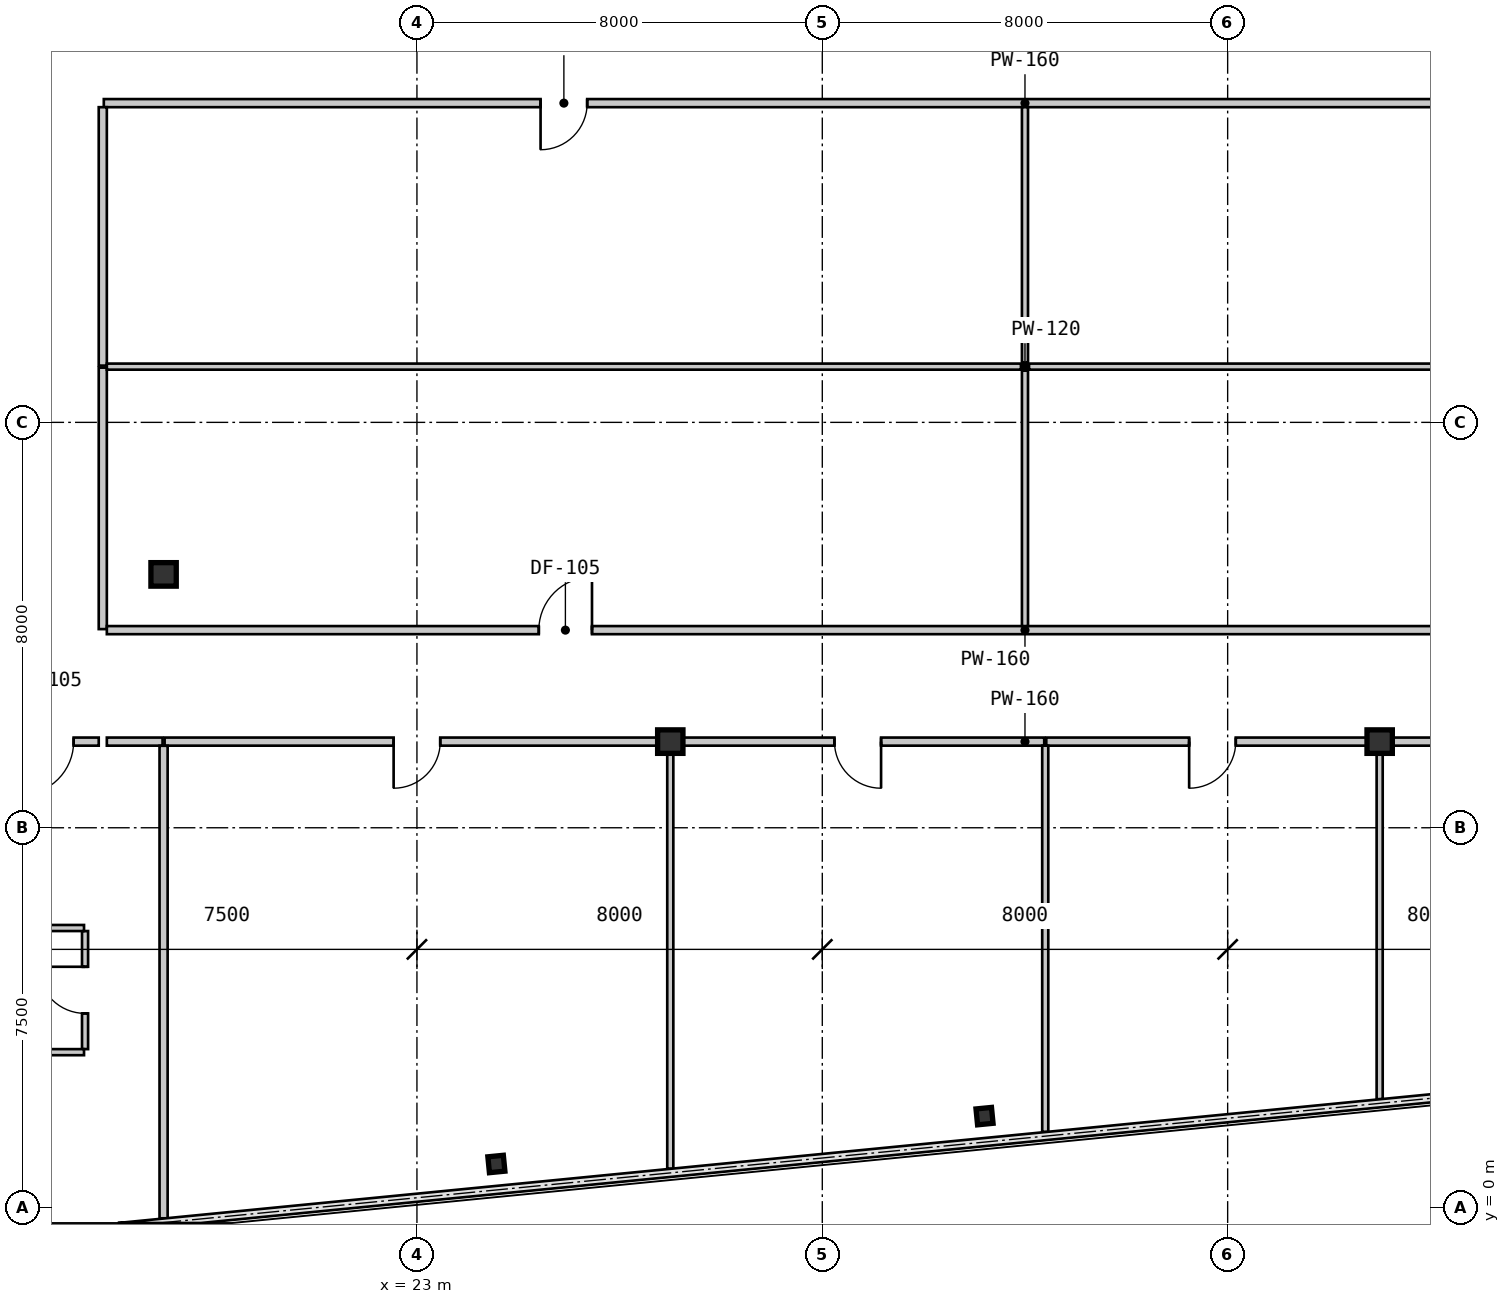
"""IFC4 building model, lengths in metres.
Left out: names, types, materials, properties, quantities, classifications, styles, units other than length and angle.
Written with IfcOpenShell. Run it as: python <this file> out.ifc"""

import sys

from ifc_helpers import new_model, si_unit, direction, frame, frame_2d, origin, origin_2d, place, context, subcontext, project, spatial, rectangle, i_section, extrude, source, transform, mapped, element, fill, save


model = new_model("IFC4")
c1 = context("Model", 3, precision=1e-05, world=origin(), true_north=direction((0.0, 1.0)))
c2 = subcontext(c1, "Body", "Model", "MODEL_VIEW")
j1 = project(units=[si_unit("LENGTHUNIT", "METRE"), si_unit("PLANEANGLEUNIT", "RADIAN")], contexts=[c1])
p1 = place(None, origin())
s1 = spatial("IfcSite", under=j1, at=p1, CompositionType="ELEMENT")
p2 = place(p1, origin())
s2 = spatial("IfcBuilding", under=s1, at=p2, CompositionType="ELEMENT")
p3 = place(p2, frame((0.0, 0.0, 74.55)))
s3 = spatial("IfcBuildingStorey", under=s2, at=p3, CompositionType="ELEMENT", Elevation=74.55)
m1 = source(origin(), c2, "Body", "SweptSolid", [
    extrude(i_section(OverallWidth=0.5, OverallDepth=0.464, WebThickness=0.022, FlangeThickness=0.034, at=origin_2d()), origin(), (0.0, 0.0, 1.0), 3.15),
])
for number, where, z_axis, x_axis in (
    (1, (28.0, 9.2, 0.0), (0.0, 0.0, 1.0), (1.0, 0.0, 0.0)),
    (2, (42.0, 9.2, 0.0), (0.0, 0.0, 1.0), (1.0, 0.0, 0.0)),
    (3, (18.0, 12.5, 0.0), (0.0, 0.0, 1.0), (1.0, 0.0, 0.0)),
):
    element("IfcColumn", number, at=place(p3, frame(where, z_axis=z_axis, x_axis=x_axis)), inside=s3, PredefinedType="COLUMN", context=c2, shape_type="MappedRepresentation", body=[
        mapped(m1, transform((0.0, 0.0, 0.0), scale=1.0)),
    ])
m2 = source(origin(), c2, "Body", "SweptSolid", [
    extrude(i_section(OverallWidth=0.307, OverallDepth=0.315, WebThickness=0.012, FlangeThickness=0.019, at=origin_2d()), origin(), (0.0, 0.0, 1.0), 3.15),
])
for number, where, z_axis, x_axis in (
    (4, (24.568, 0.865, 0.0), (0.0, 0.0, 1.0), (0.995, 0.098, 0.0)),
    (5, (34.202, 1.809, 0.0), (0.0, 0.0, 1.0), (0.995, 0.098, 0.0)),
):
    element("IfcColumn", number, at=place(p3, frame(where, z_axis=z_axis, x_axis=x_axis)), inside=s3, PredefinedType="COLUMN", context=c2, shape_type="MappedRepresentation", body=[
        mapped(m2, transform((0.0, 0.0, 0.0), scale=1.0)),
    ])
m3 = source(origin(), c2, "Body", "SweptSolid", [
    extrude(rectangle(XDim=5.16, YDim=0.16, at=frame_2d((2.58, 0.0))), origin(), (0.0, 0.0, 1.0), 2.93),
])
p4 = place(p3, frame((16.8, 16.58, 0.0), z_axis=(0.0, 0.0, 1.0), x_axis=(0.0, -1.0, 0.0)))
e6 = element("IfcWall", 6, at=p4, inside=s3, PredefinedType="PARTITIONING", context=c2, shape_type="MappedRepresentation", body=[
    mapped(m3, transform((0.0, 0.0, 0.0), scale=1.0)),
])
m4 = source(origin(), c2, "Body", "SweptSolid", [
    extrude(rectangle(XDim=18.159, YDim=0.16, at=frame_2d((9.08, 0.0))), origin(), (0.0, 0.0, 1.0), 2.93),
])
p5 = place(p3, frame((34.98, 21.8, 0.0), z_axis=(0.0, 0.0, 1.0), x_axis=(-1.0, 0.0, 0.0)))
e7 = element("IfcWall", 7, at=p5, inside=s3, PredefinedType="PARTITIONING", context=c2, shape_type="MappedRepresentation", body=[
    mapped(m4, transform((0.0, 0.0, 0.0), scale=1.0)),
])
m5 = source(origin(), c2, "Body", "SweptSolid", [
    extrude(rectangle(XDim=0.92, YDim=2.1, at=frame_2d((0.46, 1.05))), frame((0.0, 0.09, 0.0), z_axis=(0.0, -1.0, 0.0), x_axis=(1.0, 0.0, 0.0)), (0.0, 0.0, 1.0), 0.18),
])
p6 = place(p5, frame((8.62, 0.0, 0.0)))
e8 = element("IfcOpeningElement", 8, at=p6, cuts=e7, PredefinedType="OPENING", context=c2, shape_type="MappedRepresentation", body=[
    mapped(m5, transform((0.0, 0.0, 0.0), scale=1.0)),
])
m6 = source(origin(), c2, "Body", "SweptSolid", [
    extrude(rectangle(XDim=5.1, YDim=0.16, at=frame_2d((2.55, 0.0))), origin(), (0.0, 0.0, 1.0), 2.93),
])
p7 = place(p3, frame((16.8, 21.72, 0.0), z_axis=(0.0, 0.0, 1.0), x_axis=(0.0, -1.0, 0.0)))
e9 = element("IfcWall", 9, at=p7, inside=s3, PredefinedType="PARTITIONING", context=c2, shape_type="MappedRepresentation", body=[
    mapped(m6, transform((0.0, 0.0, 0.0), scale=1.0)),
])
p8 = place(p3, frame((53.18, 21.8, 0.0), z_axis=(0.0, 0.0, 1.0), x_axis=(-1.0, 0.0, 0.0)))
e10 = element("IfcWall", 10, at=p8, inside=s3, PredefinedType="PARTITIONING", context=c2, shape_type="MappedRepresentation", body=[
    mapped(m4, transform((0.0, 0.0, 0.0), scale=1.0)),
])
p9 = place(p8, frame((8.62, 0.0, 0.0)))
e11 = element("IfcOpeningElement", 11, at=p9, cuts=e10, PredefinedType="OPENING", context=c2, shape_type="MappedRepresentation", body=[
    mapped(m5, transform((0.0, 0.0, 0.0), scale=1.0)),
])
m7 = source(origin(), c2, "Body", "SweptSolid", [
    extrude(rectangle(XDim=2.04, YDim=0.16, at=frame_2d((1.02, 0.0))), origin(), (0.0, 0.0, 1.0), 2.93),
])
p10 = place(p3, frame((16.72, 9.2, 0.0), z_axis=(0.0, 0.0, 1.0), x_axis=(-1.0, 0.0, 0.0)))
e12 = element("IfcWall", 12, at=p10, inside=s3, PredefinedType="PARTITIONING", context=c2, shape_type="MappedRepresentation", body=[
    mapped(m7, transform((0.0, 0.0, 0.0), scale=1.0)),
])
m8 = source(origin(), c2, "Body", "SweptSolid", [
    extrude(rectangle(XDim=1.05, YDim=2.1, at=frame_2d((0.525, 1.05))), frame((0.0, 0.09, 0.0), z_axis=(0.0, -1.0, 0.0), x_axis=(1.0, 0.0, 0.0)), (0.0, 0.0, 1.0), 0.18),
])
p11 = place(p10, frame((0.495, 0.0, 0.0)))
e13 = element("IfcOpeningElement", 13, at=p11, cuts=e12, PredefinedType="OPENING", context=c2, shape_type="MappedRepresentation", body=[
    mapped(m8, transform((0.0, 0.0, 0.0), scale=1.0)),
])
m9 = source(origin(), c2, "Body", "SweptSolid", [
    extrude(rectangle(XDim=18.1, YDim=0.16, at=frame_2d((9.05, 0.0))), origin(), (0.0, 0.0, 1.0), 2.93),
])
p12 = place(p3, frame((16.88, 11.4, 0.0), z_axis=(0.0, 0.0, 1.0), x_axis=(1.0, 0.0, 0.0)))
e14 = element("IfcWall", 14, at=p12, inside=s3, PredefinedType="PARTITIONING", context=c2, shape_type="MappedRepresentation", body=[
    mapped(m9, transform((0.0, 0.0, 0.0), scale=1.0)),
])
p13 = place(p12, frame((8.525, 0.0, 0.0)))
e15 = element("IfcOpeningElement", 15, at=p13, cuts=e14, PredefinedType="OPENING", context=c2, shape_type="MappedRepresentation", body=[
    mapped(m8, transform((0.0, 0.0, 0.0), scale=1.0)),
])
p14 = place(p3, frame((35.02, 11.4, 0.0), z_axis=(0.0, 0.0, 1.0), x_axis=(1.0, 0.0, 0.0)))
e16 = element("IfcWall", 16, at=p14, inside=s3, PredefinedType="PARTITIONING", context=c2, shape_type="MappedRepresentation", body=[
    mapped(m9, transform((0.0, 0.0, 0.0), scale=1.0)),
])
p15 = place(p14, frame((8.525, 0.0, 0.0)))
e17 = element("IfcOpeningElement", 17, at=p15, cuts=e16, PredefinedType="OPENING", context=c2, shape_type="MappedRepresentation", body=[
    mapped(m8, transform((0.0, 0.0, 0.0), scale=1.0)),
])
m10 = source(origin(), c2, "Body", "SweptSolid", [
    extrude(rectangle(XDim=1.1, YDim=0.16, at=frame_2d((0.55, 0.0))), origin(), (0.0, 0.0, 1.0), 2.93),
])
p16 = place(p3, frame((17.98, 9.2, 0.0), z_axis=(0.0, 0.0, 1.0), x_axis=(-1.0, 0.0, 0.0)))
e18 = element("IfcWall", 18, at=p16, inside=s3, PredefinedType="PARTITIONING", context=c2, shape_type="MappedRepresentation", body=[
    mapped(m10, transform((0.0, 0.0, 0.0), scale=1.0)),
])
m11 = source(origin(), c2, "Body", "SweptSolid", [
    extrude(rectangle(XDim=9.959, YDim=0.16, at=frame_2d((4.98, 0.0))), origin(), (0.0, 0.0, 1.0), 2.93),
])
p17 = place(p3, frame((27.98, 9.2, 0.0), z_axis=(0.0, 0.0, 1.0), x_axis=(-1.0, 0.0, 0.0)))
e19 = element("IfcWall", 19, at=p17, inside=s3, PredefinedType="PARTITIONING", context=c2, shape_type="MappedRepresentation", body=[
    mapped(m11, transform((0.0, 0.0, 0.0), scale=1.0)),
])
p18 = place(p17, frame((4.52, 0.0, 0.0)))
e20 = element("IfcOpeningElement", 20, at=p18, cuts=e19, PredefinedType="OPENING", context=c2, shape_type="MappedRepresentation", body=[
    mapped(m5, transform((0.0, 0.0, 0.0), scale=1.0)),
])
m12 = source(origin(), c2, "Body", "SweptSolid", [
    extrude(rectangle(XDim=7.36, YDim=0.16, at=frame_2d((3.68, 0.0))), origin(), (0.0, 0.0, 1.0), 2.328),
])
p19 = place(p3, frame((35.38, 9.2, 0.0), z_axis=(0.0, 0.0, 1.0), x_axis=(-1.0, 0.0, 0.0)))
e21 = element("IfcWall", 21, at=p19, inside=s3, PredefinedType="PARTITIONING", context=c2, shape_type="MappedRepresentation", body=[
    mapped(m12, transform((0.0, 0.0, 0.0), scale=1.0)),
])
p20 = place(p19, frame((3.22, 0.0, 0.0)))
e22 = element("IfcOpeningElement", 22, at=p20, cuts=e21, PredefinedType="OPENING", context=c2, shape_type="MappedRepresentation", body=[
    mapped(m5, transform((0.0, 0.0, 0.0), scale=1.0)),
])
m13 = source(origin(), c2, "Body", "SweptSolid", [
    extrude(rectangle(XDim=6.56, YDim=0.16, at=frame_2d((3.28, 0.0))), origin(), (0.0, 0.0, 1.0), 2.328),
])
p21 = place(p3, frame((41.98, 9.2, 0.0), z_axis=(0.0, 0.0, 1.0), x_axis=(-1.0, 0.0, 0.0)))
e23 = element("IfcWall", 23, at=p21, inside=s3, PredefinedType="PARTITIONING", context=c2, shape_type="MappedRepresentation", body=[
    mapped(m13, transform((0.0, 0.0, 0.0), scale=1.0)),
])
p22 = place(p21, frame((2.82, 0.0, 0.0)))
e24 = element("IfcOpeningElement", 24, at=p22, cuts=e23, PredefinedType="OPENING", context=c2, shape_type="MappedRepresentation", body=[
    mapped(m5, transform((0.0, 0.0, 0.0), scale=1.0)),
])
p23 = place(p3, frame((51.98, 9.2, 0.0), z_axis=(0.0, 0.0, 1.0), x_axis=(-1.0, 0.0, 0.0)))
e25 = element("IfcWall", 25, at=p23, inside=s3, PredefinedType="PARTITIONING", context=c2, shape_type="MappedRepresentation", body=[
    mapped(m11, transform((0.0, 0.0, 0.0), scale=1.0)),
])
p24 = place(p23, frame((4.52, 0.0, 0.0)))
e26 = element("IfcOpeningElement", 26, at=p24, cuts=e25, PredefinedType="OPENING", context=c2, shape_type="MappedRepresentation", body=[
    mapped(m5, transform((0.0, 0.0, 0.0), scale=1.0)),
])
m14 = source(origin(), c2, "Body", "SweptSolid", [
    extrude(rectangle(XDim=18.04, YDim=0.12, at=frame_2d((9.02, 0.0))), origin(), (0.0, 0.0, 1.0), 2.93),
])
p25 = place(p3, frame((16.88, 16.6, 0.0), z_axis=(0.0, 0.0, 1.0), x_axis=(1.0, 0.0, 0.0)))
e27 = element("IfcWall", 27, at=p25, inside=s3, PredefinedType="PARTITIONING", context=c2, shape_type="MappedRepresentation", body=[
    mapped(m14, transform((0.0, 0.0, 0.0), scale=1.0)),
])
m15 = source(origin(), c2, "Body", "SweptSolid", [
    extrude(rectangle(XDim=5.04, YDim=0.12, at=frame_2d((2.52, 0.0))), origin(), (0.0, 0.0, 1.0), 2.93),
])
for number, where, z_axis, x_axis in (
    (28, (35.0, 16.52, 0.0), (0.0, 0.0, 1.0), (0.0, -1.0, 0.0)),
    (29, (35.0, 21.72, 0.0), (0.0, 0.0, 1.0), (0.0, -1.0, 0.0)),
):
    element("IfcWall", number, at=place(p3, frame(where, z_axis=z_axis, x_axis=x_axis)), inside=s3, PredefinedType="PARTITIONING", context=c2, shape_type="MappedRepresentation", body=[
        mapped(m15, transform((0.0, 0.0, 0.0), scale=1.0)),
    ])
p26 = place(p3, frame((35.08, 16.6, 0.0), z_axis=(0.0, 0.0, 1.0), x_axis=(1.0, 0.0, 0.0)))
e30 = element("IfcWall", 30, at=p26, inside=s3, PredefinedType="PARTITIONING", context=c2, shape_type="MappedRepresentation", body=[
    mapped(m14, transform((0.0, 0.0, 0.0), scale=1.0)),
])
m16 = source(origin(), c2, "Body", "SweptSolid", [
    extrude(rectangle(XDim=2.33, YDim=0.12, at=frame_2d((1.165, 0.0))), origin(), (0.0, 0.0, 1.0), 2.93),
])
p27 = place(p3, frame((16.45, 3.132, 0.0), z_axis=(0.0, 0.0, 1.0), x_axis=(0.0, 1.0, 0.0)))
e31 = element("IfcWall", 31, at=p27, inside=s3, PredefinedType="PARTITIONING", context=c2, shape_type="MappedRepresentation", body=[
    mapped(m16, transform((0.0, 0.0, 0.0), scale=1.0)),
])
m17 = source(origin(), c2, "Body", "SweptSolid", [
    extrude(rectangle(XDim=0.92, YDim=2.1, at=frame_2d((0.46, 1.05))), frame((0.0, 0.07, 0.0), z_axis=(0.0, -1.0, 0.0), x_axis=(1.0, 0.0, 0.0)), (0.0, 0.0, 1.0), 0.14),
])
p28 = place(p27, frame((0.705, 0.0, 0.0)))
e32 = element("IfcOpeningElement", 32, at=p28, cuts=e31, PredefinedType="OPENING", context=c2, shape_type="MappedRepresentation", body=[
    mapped(m17, transform((0.0, 0.0, 0.0), scale=1.0)),
])
m18 = source(origin(), c2, "Body", "SweptSolid", [
    extrude(rectangle(XDim=1.75, YDim=0.12, at=frame_2d((0.875, 0.0))), origin(), (0.0, 0.0, 1.0), 2.93),
])
for number, where, z_axis, x_axis in (
    (33, (14.68, 3.072, 0.0), (0.0, 0.0, 1.0), (1.0, 0.0, 0.0)),
    (34, (16.43, 5.521, 0.0), (0.0, 0.0, 1.0), (-1.0, 0.0, 0.0)),
):
    element("IfcWall", number, at=place(p3, frame(where, z_axis=z_axis, x_axis=x_axis)), inside=s3, PredefinedType="PARTITIONING", context=c2, shape_type="MappedRepresentation", body=[
        mapped(m18, transform((0.0, 0.0, 0.0), scale=1.0)),
    ])
m19 = source(origin(), c2, "Body", "SweptSolid", [
    extrude(rectangle(XDim=9.325, YDim=0.16, at=frame_2d((4.663, 0.0))), origin(), (0.0, 0.0, 1.0), 2.93),
])
p29 = place(p3, frame((18.0, 9.118, 0.0), z_axis=(0.0, 0.0, 1.0), x_axis=(0.0, -1.0, 0.0)))
e35 = element("IfcWall", 35, at=p29, inside=s3, PredefinedType="PARTITIONING", context=c2, shape_type="MappedRepresentation", body=[
    mapped(m19, transform((0.0, 0.0, 0.0), scale=1.0)),
])
m20 = source(origin(), c2, "Body", "SweptSolid", [
    extrude(rectangle(XDim=8.349, YDim=0.12, at=frame_2d((4.174, 0.0))), origin(), (0.0, 0.0, 1.0), 2.93),
])
p30 = place(p3, frame((28.0, 9.12, 0.0), z_axis=(0.0, 0.0, 1.0), x_axis=(0.0, -1.0, 0.0)))
e36 = element("IfcWall", 36, at=p30, inside=s3, PredefinedType="PARTITIONING", context=c2, shape_type="MappedRepresentation", body=[
    mapped(m20, transform((0.0, 0.0, 0.0), scale=1.0)),
])
m21 = source(origin(), c2, "Body", "SweptSolid", [
    extrude(rectangle(XDim=7.623, YDim=0.12, at=frame_2d((3.812, 0.0))), origin(), (0.0, 0.0, 1.0), 2.93),
])
p31 = place(p3, frame((35.4, 9.12, 0.0), z_axis=(0.0, 0.0, 1.0), x_axis=(0.0, -1.0, 0.0)))
e37 = element("IfcWall", 37, at=p31, inside=s3, PredefinedType="PARTITIONING", context=c2, shape_type="MappedRepresentation", body=[
    mapped(m21, transform((0.0, 0.0, 0.0), scale=1.0)),
])
m22 = source(origin(), c2, "Body", "SweptSolid", [
    extrude(rectangle(XDim=6.976, YDim=0.12, at=frame_2d((3.488, 0.0))), origin(), (0.0, 0.0, 1.0), 2.93),
])
p32 = place(p3, frame((42.0, 9.12, 0.0), z_axis=(0.0, 0.0, 1.0), x_axis=(0.0, -1.0, 0.0)))
e38 = element("IfcWall", 38, at=p32, inside=s3, PredefinedType="PARTITIONING", context=c2, shape_type="MappedRepresentation", body=[
    mapped(m22, transform((0.0, 0.0, 0.0), scale=1.0)),
])
m23 = source(origin(), c2, "Body", "SweptSolid", [
    extrude(rectangle(XDim=0.92, YDim=2.1, at=frame_2d((0.46, 1.05))), frame((0.0, 0.025, 0.0), z_axis=(0.0, -1.0, 0.0), x_axis=(1.0, 0.0, 0.0)), (0.0, 0.0, 1.0), 0.05),
])
p33 = place(p6, origin())
e39 = element("IfcDoor", 39, at=p33, inside=s3, OperationType="SINGLE_SWING_RIGHT", PredefinedType="DOOR", context=c2, shape_type="MappedRepresentation", body=[
    mapped(m23, transform((0.0, 0.0, 0.0), scale=1.0)),
])
fill(e8, e39)
m24 = source(origin(), c2, "Body", "SweptSolid", [
    extrude(rectangle(XDim=1.05, YDim=2.1, at=frame_2d((0.525, 1.05))), frame((0.0, 0.025, 0.0), z_axis=(0.0, -1.0, 0.0), x_axis=(1.0, 0.0, 0.0)), (0.0, 0.0, 1.0), 0.05),
])
p34 = place(p11, origin())
e40 = element("IfcDoor", 40, at=p34, inside=s3, OperationType="SINGLE_SWING_RIGHT", PredefinedType="DOOR", context=c2, shape_type="MappedRepresentation", body=[
    mapped(m24, transform((0.0, 0.0, 0.0), scale=1.0)),
])
fill(e13, e40)
p35 = place(p13, origin())
e41 = element("IfcDoor", 41, at=p35, inside=s3, OperationType="SINGLE_SWING_RIGHT", PredefinedType="DOOR", context=c2, shape_type="MappedRepresentation", body=[
    mapped(m24, transform((0.0, 0.0, 0.0), scale=1.0)),
])
fill(e15, e41)
p36 = place(p18, origin())
e42 = element("IfcDoor", 42, at=p36, inside=s3, OperationType="SINGLE_SWING_RIGHT", PredefinedType="DOOR", context=c2, shape_type="MappedRepresentation", body=[
    mapped(m23, transform((0.0, 0.0, 0.0), scale=1.0)),
])
fill(e20, e42)
p37 = place(p20, origin())
e43 = element("IfcDoor", 43, at=p37, inside=s3, OperationType="SINGLE_SWING_LEFT", PredefinedType="DOOR", context=c2, shape_type="MappedRepresentation", body=[
    mapped(m23, transform((0.0, 0.0, 0.0), scale=1.0)),
])
fill(e22, e43)
p38 = place(p22, origin())
e44 = element("IfcDoor", 44, at=p38, inside=s3, OperationType="SINGLE_SWING_RIGHT", PredefinedType="DOOR", context=c2, shape_type="MappedRepresentation", body=[
    mapped(m23, transform((0.0, 0.0, 0.0), scale=1.0)),
])
fill(e24, e44)
p39 = place(p28, origin())
e45 = element("IfcDoor", 45, at=p39, inside=s3, OperationType="SINGLE_SWING_RIGHT", PredefinedType="DOOR", context=c2, shape_type="MappedRepresentation", body=[
    mapped(m23, transform((0.0, 0.0, 0.0), scale=1.0)),
])
fill(e32, e45)
save(model, sys.argv[1])
